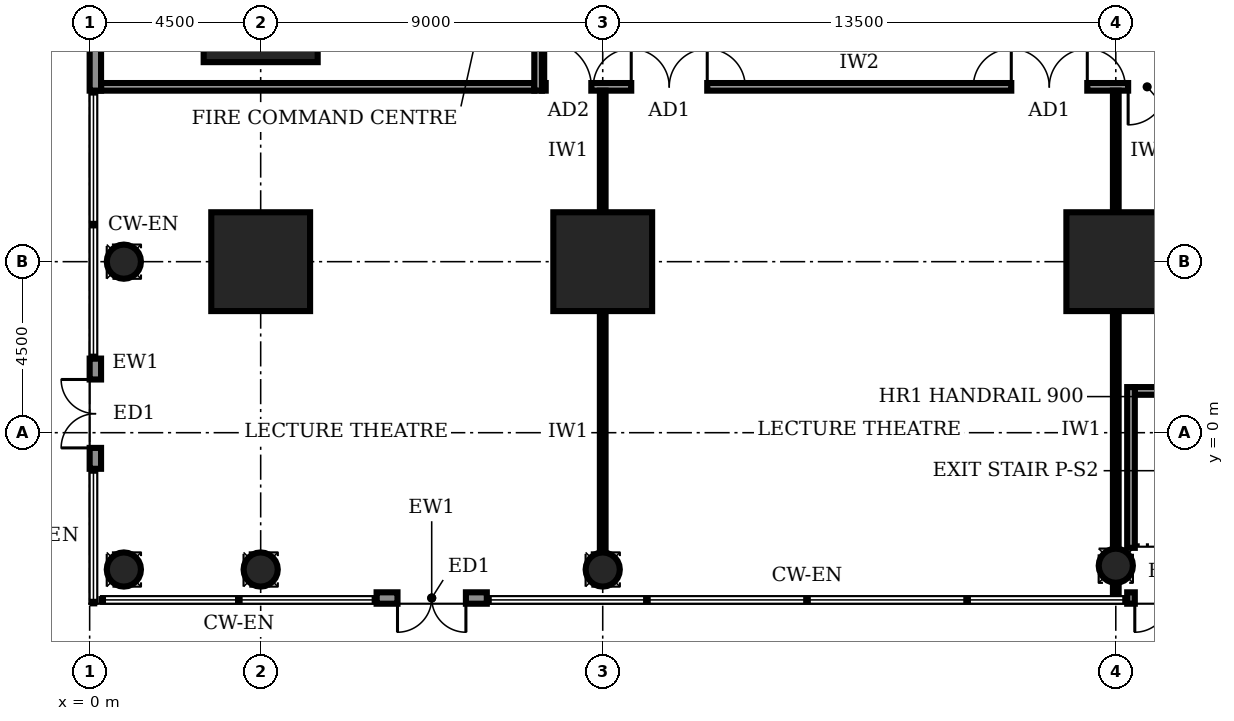
"""IFC4 building model, lengths in metres.
Left out: names, types, materials, properties, quantities, classifications, styles, units other than length and angle.
Written with IfcOpenShell. Run it as: python <this file> out.ifc"""

import sys

from ifc_helpers import new_model, si_unit, direction, frame, frame_2d, origin, origin_2d, place, context, subcontext, project, spatial, rectangle, circle, extrude, element, fill, save


model = new_model("IFC4")
c1 = context("Model", 3, precision=1e-05, world=origin(), true_north=direction((0.0, 1.0)))
c2 = subcontext(c1, "Body", "Model", "MODEL_VIEW")
j1 = project(units=[si_unit("LENGTHUNIT", "METRE"), si_unit("PLANEANGLEUNIT", "RADIAN")], contexts=[c1])
p1 = place(None, origin())
s1 = spatial("IfcSite", under=j1, at=p1, CompositionType="ELEMENT")
p2 = place(p1, origin())
s2 = spatial("IfcBuilding", under=s1, at=p2, CompositionType="ELEMENT")
p3 = place(p2, origin())
s3 = spatial("IfcBuildingStorey", under=s2, at=p3, CompositionType="ELEMENT", Elevation=0.0)
for number, where, z_axis, x_axis in (
    (1, (4.5, 4.5, -0.4), (0.0, 0.0, 1.0), (1.0, 0.0, 0.0)),
    (2, (13.5, 4.5, -0.4), (0.0, 0.0, 1.0), (1.0, 0.0, 0.0)),
    (3, (27.0, 4.5, -0.4), (0.0, 0.0, 1.0), (1.0, 0.0, 0.0)),
):
    element("IfcColumn", number, at=place(p3, frame(where, z_axis=z_axis, x_axis=x_axis)), inside=s3, PredefinedType="COLUMN", context=c2, shape_type="SweptSolid", body=[
        extrude(rectangle(XDim=2.6, YDim=2.6, at=origin_2d()), origin(), (0.0, 0.0, 1.0), 6.4),
    ])
p4 = place(p3, frame((4.5, 11.25, -0.4), z_axis=(0.0, 0.0, 1.0), x_axis=(1.0, 0.0, 0.0)))
e4 = element("IfcColumn", 4, at=p4, inside=s3, PredefinedType="COLUMN", context=c2, shape_type="SweptSolid", body=[
    extrude(rectangle(XDim=3.0, YDim=3.0, at=origin_2d()), origin(), (0.0, 0.0, 1.0), 6.4),
])
for number, where, z_axis, x_axis in (
    (5, (0.9, -3.6, -0.4), (0.0, 0.0, 1.0), (1.0, 0.0, 0.0)),
    (6, (4.5, -3.6, -0.4), (0.0, 0.0, 1.0), (1.0, 0.0, 0.0)),
    (7, (13.5, -3.6, -0.4), (0.0, 0.0, 1.0), (1.0, 0.0, 0.0)),
    (8, (27.0, -3.5, -0.4), (0.0, 0.0, 1.0), (1.0, 0.0, 0.0)),
    (9, (0.9, 4.5, -0.4), (0.0, 0.0, 1.0), (1.0, 0.0, 0.0)),
):
    element("IfcColumn", number, at=place(p3, frame(where, z_axis=z_axis, x_axis=x_axis)), inside=s3, PredefinedType="COLUMN", context=c2, shape_type="SweptSolid", body=[
        extrude(circle(Radius=0.45, at=origin_2d()), origin(), (0.0, 0.0, 1.0), 6.4),
    ])
p5 = place(p3, frame((7.55, -4.35, 0.0), z_axis=(0.0, 0.0, 1.0), x_axis=(1.0, 0.0, 0.0)))
e10 = element("IfcWall", 10, at=p5, inside=s3, PredefinedType="STANDARD", context=c2, shape_type="SweptSolid", body=[
    extrude(rectangle(XDim=2.9, YDim=0.3, at=frame_2d((1.45, 0.0))), origin(), (0.0, 0.0, 1.0), 5.7),
])
p6 = place(p5, frame((0.55, 0.0, 0.0)))
e11 = element("IfcOpeningElement", 11, at=p6, cuts=e10, PredefinedType="OPENING", context=c2, shape_type="SweptSolid", body=[
    extrude(rectangle(XDim=1.8, YDim=2.4, at=frame_2d((0.9, 1.2))), frame((0.0, 0.16, 0.0), z_axis=(0.0, -1.0, 0.0), x_axis=(1.0, 0.0, 0.0)), (0.0, 0.0, 1.0), 0.32),
])
p7 = place(p3, frame((27.3, -4.35, 0.0), z_axis=(0.0, 0.0, 1.0), x_axis=(1.0, 0.0, 0.0)))
e12 = element("IfcWall", 12, at=p7, inside=s3, PredefinedType="STANDARD", context=c2, shape_type="SweptSolid", body=[
    extrude(rectangle(XDim=2.2, YDim=0.3, at=frame_2d((1.1, 0.0))), origin(), (0.0, 0.0, 1.0), 5.7),
])
p8 = place(p7, frame((0.2, 0.0, 0.0)))
e13 = element("IfcOpeningElement", 13, at=p8, cuts=e12, PredefinedType="OPENING", context=c2, shape_type="SweptSolid", body=[
    extrude(rectangle(XDim=1.8, YDim=2.4, at=frame_2d((0.9, 1.2))), frame((0.0, 0.16, 0.0), z_axis=(0.0, -1.0, 0.0), x_axis=(1.0, 0.0, 0.0)), (0.0, 0.0, 1.0), 0.32),
])
p9 = place(p3, frame((0.15, 1.95, 0.0), z_axis=(0.0, 0.0, 1.0), x_axis=(0.0, -1.0, 0.0)))
e14 = element("IfcWall", 14, at=p9, inside=s3, PredefinedType="STANDARD", context=c2, shape_type="SweptSolid", body=[
    extrude(rectangle(XDim=2.9, YDim=0.3, at=frame_2d((1.45, 0.0))), origin(), (0.0, 0.0, 1.0), 5.7),
])
p10 = place(p9, frame((0.55, 0.0, 0.0)))
e15 = element("IfcOpeningElement", 15, at=p10, cuts=e14, PredefinedType="OPENING", context=c2, shape_type="SweptSolid", body=[
    extrude(rectangle(XDim=1.8, YDim=2.4, at=frame_2d((0.9, 1.2))), frame((0.0, 0.16, 0.0), z_axis=(0.0, -1.0, 0.0), x_axis=(1.0, 0.0, 0.0)), (0.0, 0.0, 1.0), 0.32),
])
p11 = place(p3, frame((0.15, 13.5, 0.0), z_axis=(0.0, 0.0, 1.0), x_axis=(0.0, -1.0, 0.0)))
e16 = element("IfcWall", 16, at=p11, inside=s3, PredefinedType="STANDARD", context=c2, shape_type="SweptSolid", body=[
    extrude(rectangle(XDim=4.5, YDim=0.3, at=frame_2d((2.25, 0.0))), origin(), (0.0, 0.0, 1.0), 5.7),
])
p12 = place(p11, frame((0.1, 0.0, 0.0)))
e17 = element("IfcOpeningElement", 17, at=p12, cuts=e16, PredefinedType="OPENING", context=c2, shape_type="SweptSolid", body=[
    extrude(rectangle(XDim=1.6, YDim=2.4, at=frame_2d((0.8, 1.2))), frame((0.0, 0.16, 0.0), z_axis=(0.0, -1.0, 0.0), x_axis=(1.0, 0.0, 0.0)), (0.0, 0.0, 1.0), 0.32),
])
p13 = place(p3, frame((11.9, 9.1, 0.0), z_axis=(0.0, 0.0, 1.0), x_axis=(1.0, 0.0, 0.0)))
e18 = element("IfcWall", 18, at=p13, inside=s3, PredefinedType="SOLIDWALL", context=c2, shape_type="SweptSolid", body=[
    extrude(rectangle(XDim=16.9, YDim=0.2, at=frame_2d((8.45, 0.0))), origin(), (0.0, 0.0, 1.0), 5.7),
])
p14 = place(p13, frame((0.1, 0.0, 0.0)))
e19 = element("IfcOpeningElement", 19, at=p14, cuts=e18, PredefinedType="OPENING", context=c2, shape_type="SweptSolid", body=[
    extrude(rectangle(XDim=1.2, YDim=2.4, at=frame_2d((0.6, 1.2))), frame((0.0, 0.11, 0.0), z_axis=(0.0, -1.0, 0.0), x_axis=(1.0, 0.0, 0.0)), (0.0, 0.0, 1.0), 0.22),
])
p15 = place(p13, frame((2.35, 0.0, 0.0)))
e20 = element("IfcOpeningElement", 20, at=p15, cuts=e18, PredefinedType="OPENING", context=c2, shape_type="SweptSolid", body=[
    extrude(rectangle(XDim=2.0, YDim=2.4, at=frame_2d((1.0, 1.2))), frame((0.0, 0.11, 0.0), z_axis=(0.0, -1.0, 0.0), x_axis=(1.0, 0.0, 0.0)), (0.0, 0.0, 1.0), 0.22),
])
p16 = place(p13, frame((12.35, 0.0, 0.0)))
e21 = element("IfcOpeningElement", 21, at=p16, cuts=e18, PredefinedType="OPENING", context=c2, shape_type="SweptSolid", body=[
    extrude(rectangle(XDim=2.0, YDim=2.4, at=frame_2d((1.0, 1.2))), frame((0.0, 0.11, 0.0), z_axis=(0.0, -1.0, 0.0), x_axis=(1.0, 0.0, 0.0)), (0.0, 0.0, 1.0), 0.22),
])
p17 = place(p13, frame((15.425, 0.0, 0.0)))
e22 = element("IfcOpeningElement", 22, at=p17, cuts=e18, PredefinedType="OPENING", context=c2, shape_type="SweptSolid", body=[
    extrude(rectangle(XDim=1.0, YDim=2.1, at=frame_2d((0.5, 1.05))), frame((0.0, 0.11, 0.0), z_axis=(0.0, -1.0, 0.0), x_axis=(1.0, 0.0, 0.0)), (0.0, 0.0, 1.0), 0.22),
])
p18 = place(p3, frame((11.8, 31.3, 0.0), z_axis=(0.0, 0.0, 1.0), x_axis=(0.0, -1.0, 0.0)))
e23 = element("IfcWall", 23, at=p18, inside=s3, PredefinedType="SOLIDWALL", context=c2, shape_type="SweptSolid", body=[
    extrude(rectangle(XDim=22.3, YDim=0.2, at=frame_2d((11.15, 0.0))), origin(), (0.0, 0.0, 1.0), 5.7),
])
p19 = place(p18, frame((19.55, 0.0, 0.0)))
e24 = element("IfcOpeningElement", 24, at=p19, cuts=e23, PredefinedType="OPENING", context=c2, shape_type="SweptSolid", body=[
    extrude(rectangle(XDim=1.0, YDim=2.1, at=frame_2d((0.5, 1.05))), frame((0.0, 0.11, 0.0), z_axis=(0.0, -1.0, 0.0), x_axis=(1.0, 0.0, 0.0)), (0.0, 0.0, 1.0), 0.22),
])
p20 = place(p18, frame((15.45, 0.0, 0.0)))
e25 = element("IfcOpeningElement", 25, at=p20, cuts=e23, PredefinedType="OPENING", context=c2, shape_type="SweptSolid", body=[
    extrude(rectangle(XDim=0.9, YDim=2.1, at=frame_2d((0.45, 1.05))), frame((0.0, 0.11, 0.0), z_axis=(0.0, -1.0, 0.0), x_axis=(1.0, 0.0, 0.0)), (0.0, 0.0, 1.0), 0.22),
])
p21 = place(p18, frame((12.45, 0.0, 0.0)))
e26 = element("IfcOpeningElement", 26, at=p21, cuts=e23, PredefinedType="OPENING", context=c2, shape_type="SweptSolid", body=[
    extrude(rectangle(XDim=0.9, YDim=2.1, at=frame_2d((0.45, 1.05))), frame((0.0, 0.11, 0.0), z_axis=(0.0, -1.0, 0.0), x_axis=(1.0, 0.0, 0.0)), (0.0, 0.0, 1.0), 0.22),
])
p22 = place(p18, frame((7.6, 0.0, 0.0)))
e27 = element("IfcOpeningElement", 27, at=p22, cuts=e23, PredefinedType="OPENING", context=c2, shape_type="SweptSolid", body=[
    extrude(rectangle(XDim=0.9, YDim=2.1, at=frame_2d((0.45, 1.05))), frame((0.0, 0.11, 0.0), z_axis=(0.0, -1.0, 0.0), x_axis=(1.0, 0.0, 0.0)), (0.0, 0.0, 1.0), 0.22),
])
p23 = place(p18, frame((4.8, 0.0, 0.0)))
e28 = element("IfcOpeningElement", 28, at=p23, cuts=e23, PredefinedType="OPENING", context=c2, shape_type="SweptSolid", body=[
    extrude(rectangle(XDim=1.0, YDim=2.1, at=frame_2d((0.5, 1.05))), frame((0.0, 0.11, 0.0), z_axis=(0.0, -1.0, 0.0), x_axis=(1.0, 0.0, 0.0)), (0.0, 0.0, 1.0), 0.22),
])
p24 = place(p18, frame((10.3, 0.0, 0.0)))
e29 = element("IfcOpeningElement", 29, at=p24, cuts=e23, PredefinedType="OPENING", context=c2, shape_type="SweptSolid", body=[
    extrude(rectangle(XDim=1.0, YDim=2.1, at=frame_2d((0.5, 1.05))), frame((0.0, 0.11, 0.0), z_axis=(0.0, -1.0, 0.0), x_axis=(1.0, 0.0, 0.0)), (0.0, 0.0, 1.0), 0.22),
])
p25 = place(p18, frame((1.55, 0.0, 0.0)))
e30 = element("IfcOpeningElement", 30, at=p25, cuts=e23, PredefinedType="OPENING", context=c2, shape_type="SweptSolid", body=[
    extrude(rectangle(XDim=1.0, YDim=2.1, at=frame_2d((0.5, 1.05))), frame((0.0, 0.11, 0.0), z_axis=(0.0, -1.0, 0.0), x_axis=(1.0, 0.0, 0.0)), (0.0, 0.0, 1.0), 0.22),
])
p26 = place(p3, frame((0.3, 9.1, 0.0), z_axis=(0.0, 0.0, 1.0), x_axis=(1.0, 0.0, 0.0)))
e31 = element("IfcWall", 31, at=p26, inside=s3, PredefinedType="SOLIDWALL", context=c2, shape_type="SweptSolid", body=[
    extrude(rectangle(XDim=11.4, YDim=0.2, at=frame_2d((5.7, 0.0))), origin(), (0.0, 0.0, 1.0), 5.7),
])
p27 = place(p3, frame((13.5, -3.13, 0.0), z_axis=(0.0, 0.0, 1.0), x_axis=(0.0, 1.0, 0.0)))
e32 = element("IfcWall", 32, at=p27, inside=s3, PredefinedType="PARTITIONING", context=c2, shape_type="SweptSolid", body=[
    extrude(rectangle(XDim=6.31, YDim=0.15, at=frame_2d((3.155, 0.0))), origin(), (0.0, 0.0, 1.0), 4.7),
])
p28 = place(p3, frame((13.5, 5.82, 0.0), z_axis=(0.0, 0.0, 1.0), x_axis=(0.0, 1.0, 0.0)))
e33 = element("IfcWall", 33, at=p28, inside=s3, PredefinedType="PARTITIONING", context=c2, shape_type="SweptSolid", body=[
    extrude(rectangle(XDim=3.18, YDim=0.15, at=frame_2d((1.59, 0.0))), origin(), (0.0, 0.0, 1.0), 4.8),
])
p29 = place(p3, frame((27.0, -4.32, 0.0), z_axis=(0.0, 0.0, 1.0), x_axis=(0.0, 1.0, 0.0)))
e34 = element("IfcWall", 34, at=p29, inside=s3, PredefinedType="PARTITIONING", context=c2, shape_type="SweptSolid", body=[
    extrude(rectangle(XDim=0.35, YDim=0.15, at=frame_2d((0.175, 0.0))), origin(), (0.0, 0.0, 1.0), 5.7),
])
p30 = place(p3, frame((27.0, -3.03, 0.0), z_axis=(0.0, 0.0, 1.0), x_axis=(0.0, 1.0, 0.0)))
e35 = element("IfcWall", 35, at=p30, inside=s3, PredefinedType="PARTITIONING", context=c2, shape_type="SweptSolid", body=[
    extrude(rectangle(XDim=6.21, YDim=0.15, at=frame_2d((3.105, 0.0))), origin(), (0.0, 0.0, 1.0), 4.7),
])
p31 = place(p3, frame((27.0, 5.82, 0.0), z_axis=(0.0, 0.0, 1.0), x_axis=(0.0, 1.0, 0.0)))
e36 = element("IfcWall", 36, at=p31, inside=s3, PredefinedType="PARTITIONING", context=c2, shape_type="SweptSolid", body=[
    extrude(rectangle(XDim=3.18, YDim=0.15, at=frame_2d((1.59, 0.0))), origin(), (0.0, 0.0, 1.0), 4.8),
])
p32 = place(p3, frame((27.5, 1.1, 0.0), z_axis=(0.0, 0.0, 1.0), x_axis=(1.0, 0.0, 0.0)))
e37 = element("IfcWall", 37, at=p32, inside=s3, PredefinedType="SOLIDWALL", context=c2, shape_type="SweptSolid", body=[
    extrude(rectangle(XDim=8.0, YDim=0.2, at=frame_2d((4.0, 0.0))), origin(), (0.0, 0.0, 1.0), 5.7),
])
p33 = place(p3, frame((27.4, -3.03, 0.0), z_axis=(0.0, 0.0, 1.0), x_axis=(0.0, 1.0, 0.0)))
e38 = element("IfcWall", 38, at=p33, inside=s3, PredefinedType="SOLIDWALL", context=c2, shape_type="SweptSolid", body=[
    extrude(rectangle(XDim=4.23, YDim=0.2, at=frame_2d((2.115, 0.0))), origin(), (0.0, 0.0, 1.0), 5.7),
])
p34 = place(p6, frame((1.8, 0.0, 0.0), z_axis=(0.0, 0.0, 1.0), x_axis=(-1.0, 0.0, 0.0)))
e39 = element("IfcDoor", 39, at=p34, inside=s3, OperationType="DOUBLE_DOOR_SINGLE_SWING", PredefinedType="DOOR", context=c2, shape_type="SweptSolid", body=[
    extrude(rectangle(XDim=1.8, YDim=2.4, at=frame_2d((0.9, 1.2))), frame((0.0, 0.025, 0.0), z_axis=(0.0, -1.0, 0.0), x_axis=(1.0, 0.0, 0.0)), (0.0, 0.0, 1.0), 0.05),
])
fill(e11, e39)
p35 = place(p8, frame((1.8, 0.0, 0.0), z_axis=(0.0, 0.0, 1.0), x_axis=(-1.0, 0.0, 0.0)))
e40 = element("IfcDoor", 40, at=p35, inside=s3, OperationType="DOUBLE_DOOR_SINGLE_SWING", PredefinedType="DOOR", context=c2, shape_type="SweptSolid", body=[
    extrude(rectangle(XDim=1.8, YDim=2.4, at=frame_2d((0.9, 1.2))), frame((0.0, 0.025, 0.0), z_axis=(0.0, -1.0, 0.0), x_axis=(1.0, 0.0, 0.0)), (0.0, 0.0, 1.0), 0.05),
])
fill(e13, e40)
p36 = place(p10, frame((1.8, 0.0, 0.0), z_axis=(0.0, 0.0, 1.0), x_axis=(-1.0, 0.0, 0.0)))
e41 = element("IfcDoor", 41, at=p36, inside=s3, OperationType="DOUBLE_DOOR_SINGLE_SWING", PredefinedType="DOOR", context=c2, shape_type="SweptSolid", body=[
    extrude(rectangle(XDim=1.8, YDim=2.4, at=frame_2d((0.9, 1.2))), frame((0.0, 0.025, 0.0), z_axis=(0.0, -1.0, 0.0), x_axis=(1.0, 0.0, 0.0)), (0.0, 0.0, 1.0), 0.05),
])
fill(e15, e41)
p37 = place(p14, origin())
e42 = element("IfcDoor", 42, at=p37, inside=s3, OperationType="SINGLE_SWING_LEFT", PredefinedType="DOOR", context=c2, shape_type="SweptSolid", body=[
    extrude(rectangle(XDim=1.2, YDim=2.4, at=frame_2d((0.6, 1.2))), frame((0.0, 0.025, 0.0), z_axis=(0.0, -1.0, 0.0), x_axis=(1.0, 0.0, 0.0)), (0.0, 0.0, 1.0), 0.05),
])
fill(e19, e42)
p38 = place(p15, origin())
e43 = element("IfcDoor", 43, at=p38, inside=s3, OperationType="DOUBLE_DOOR_SINGLE_SWING", PredefinedType="DOOR", context=c2, shape_type="SweptSolid", body=[
    extrude(rectangle(XDim=2.0, YDim=2.4, at=frame_2d((1.0, 1.2))), frame((0.0, 0.025, 0.0), z_axis=(0.0, -1.0, 0.0), x_axis=(1.0, 0.0, 0.0)), (0.0, 0.0, 1.0), 0.05),
])
fill(e20, e43)
p39 = place(p16, origin())
e44 = element("IfcDoor", 44, at=p39, inside=s3, OperationType="DOUBLE_DOOR_SINGLE_SWING", PredefinedType="DOOR", context=c2, shape_type="SweptSolid", body=[
    extrude(rectangle(XDim=2.0, YDim=2.4, at=frame_2d((1.0, 1.2))), frame((0.0, 0.025, 0.0), z_axis=(0.0, -1.0, 0.0), x_axis=(1.0, 0.0, 0.0)), (0.0, 0.0, 1.0), 0.05),
])
fill(e21, e44)
p40 = place(p17, frame((1.0, 0.0, 0.0), z_axis=(0.0, 0.0, 1.0), x_axis=(-1.0, 0.0, 0.0)))
e45 = element("IfcDoor", 45, at=p40, inside=s3, OperationType="SINGLE_SWING_RIGHT", PredefinedType="DOOR", context=c2, shape_type="SweptSolid", body=[
    extrude(rectangle(XDim=1.0, YDim=2.1, at=frame_2d((0.5, 1.05))), frame((0.0, 0.025, 0.0), z_axis=(0.0, -1.0, 0.0), x_axis=(1.0, 0.0, 0.0)), (0.0, 0.0, 1.0), 0.05),
])
fill(e22, e45)
save(model, sys.argv[1])
